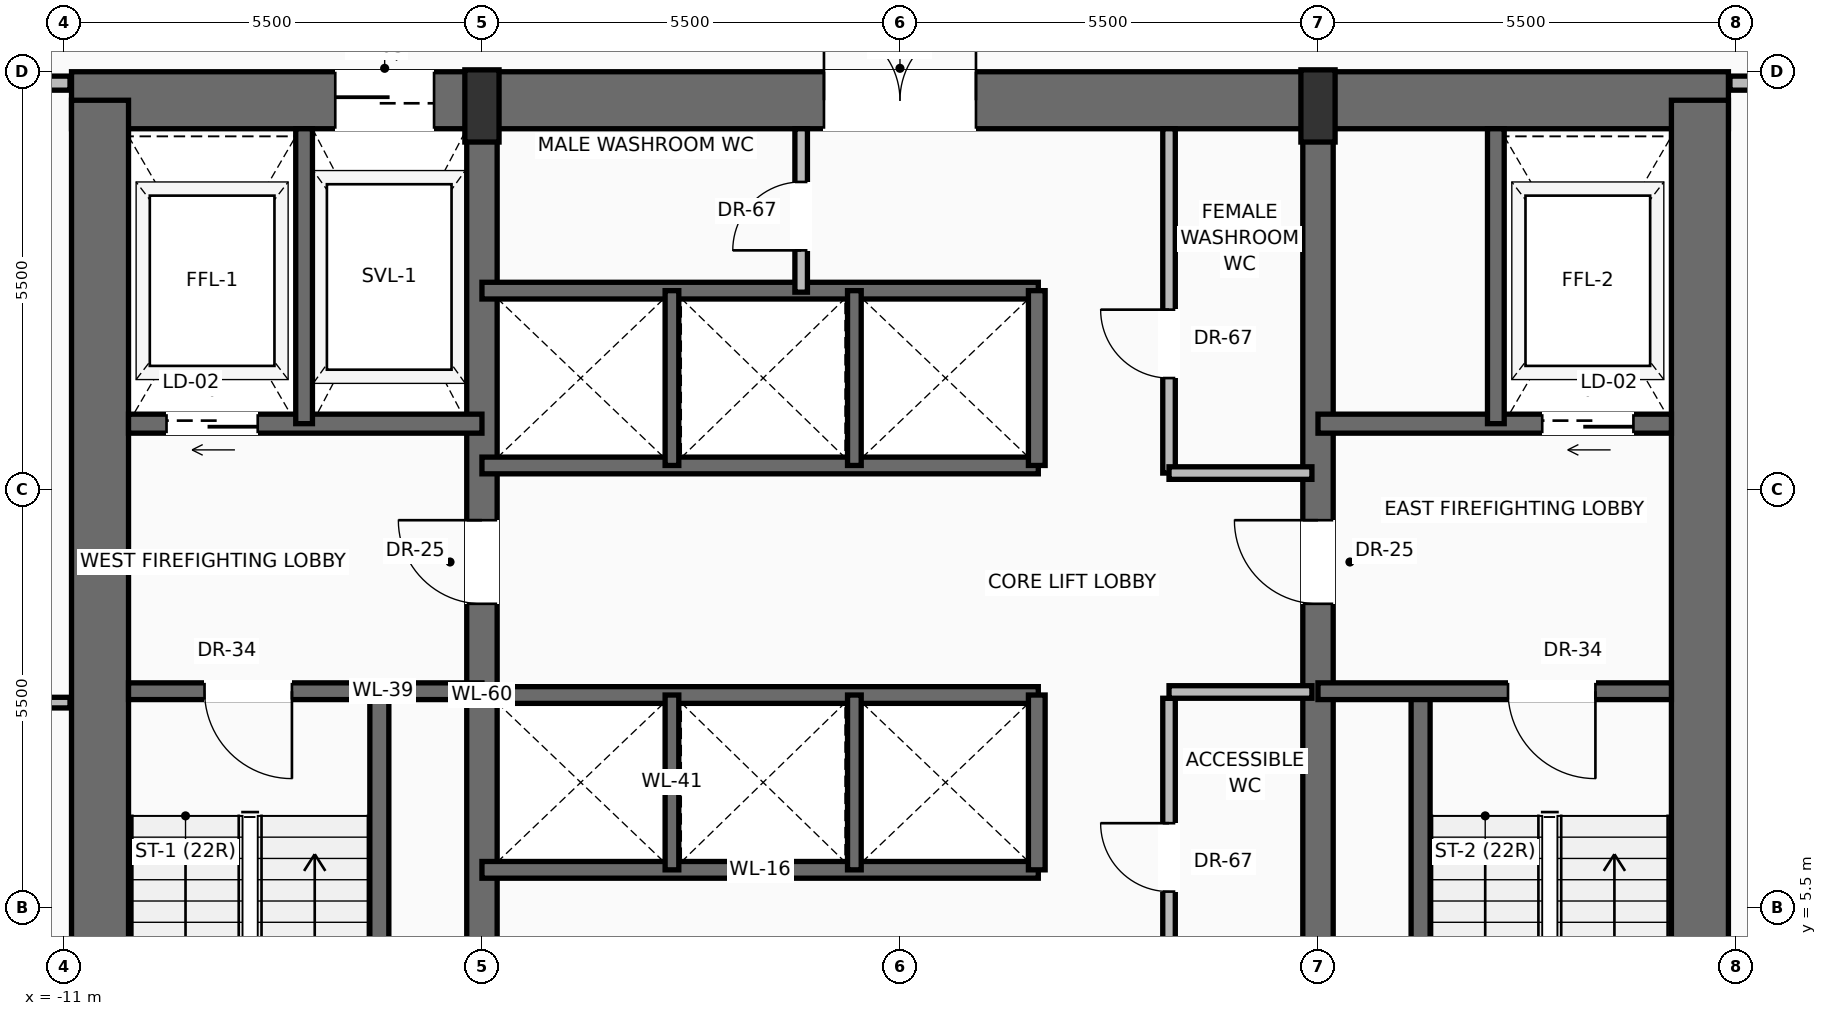
"""IFC4 building model, lengths in metres.
Left out: names, types, materials, properties, quantities, classifications, styles, units other than length and angle.
Written with IfcOpenShell. Run it as: python <this file> out.ifc"""

import sys

from ifc_helpers import new_model, si_unit, direction, frame, frame_2d, origin, origin_2d, place, context, subcontext, project, spatial, rectangle, extrude, source, transform, mapped, element, fill, save


model = new_model("IFC4")
c1 = context("Model", 3, precision=1e-05, world=origin(), true_north=direction((0.0, 1.0)))
c2 = subcontext(c1, "Body", "Model", "MODEL_VIEW")
j1 = project(units=[si_unit("LENGTHUNIT", "METRE"), si_unit("PLANEANGLEUNIT", "RADIAN")], contexts=[c1])
p1 = place(None, origin())
s1 = spatial("IfcSite", under=j1, at=p1, CompositionType="ELEMENT")
p2 = place(p1, origin())
s2 = spatial("IfcBuilding", under=s1, at=p2, CompositionType="ELEMENT")
p3 = place(p2, frame((0.0, 0.0, 106.2)))
s3 = spatial("IfcBuildingStorey", under=s2, at=p3, CompositionType="ELEMENT", Elevation=106.2)
p4 = place(p3, frame((-10.9, 16.125, 0.0), z_axis=(0.0, 0.0, 1.0), x_axis=(1.0, 0.0, 0.0)))
e1 = element("IfcWall", 1, at=p4, inside=s3, PredefinedType="SHEAR", context=c2, shape_type="SweptSolid", body=[
    extrude(rectangle(XDim=21.8, YDim=0.75, at=frame_2d((10.9, 0.0))), origin(), (0.0, 0.0, 1.0), 3.45),
])
p5 = place(p4, frame((3.47, 0.0, 0.0)))
e2 = element("IfcOpeningElement", 2, at=p5, cuts=e1, PredefinedType="OPENING", context=c2, shape_type="SweptSolid", body=[
    extrude(rectangle(XDim=1.3, YDim=2.3, at=frame_2d((0.65, 1.15))), frame((0.0, 0.385, 0.0), z_axis=(0.0, -1.0, 0.0), x_axis=(1.0, 0.0, 0.0)), (0.0, 0.0, 1.0), 0.77),
])
p6 = place(p4, frame((9.9, 0.0, 0.0)))
e3 = element("IfcOpeningElement", 3, at=p6, cuts=e1, PredefinedType="OPENING", context=c2, shape_type="SweptSolid", body=[
    extrude(rectangle(XDim=2.0, YDim=2.4, at=frame_2d((1.0, 1.2))), frame((0.0, 0.385, 0.0), z_axis=(0.0, -1.0, 0.0), x_axis=(1.0, 0.0, 0.0)), (0.0, 0.0, 1.0), 0.77),
])
for number, where, z_axis, x_axis in (
    (4, (-10.525, 0.475, 0.0), (0.0, 0.0, 1.0), (0.0, 1.0, 0.0)),
    (5, (10.525, 0.475, 0.0), (0.0, 0.0, 1.0), (0.0, 1.0, 0.0)),
):
    element("IfcWall", number, at=place(p3, frame(where, z_axis=z_axis, x_axis=x_axis)), inside=s3, PredefinedType="SHEAR", context=c2, shape_type="SweptSolid", body=[
        extrude(rectangle(XDim=15.65, YDim=0.75, at=frame_2d((7.825, 0.0))), origin(), (0.0, 0.0, 1.0), 3.45),
    ])
p7 = place(p3, frame((-5.5, 0.475, 0.0), z_axis=(0.0, 0.0, 1.0), x_axis=(0.0, 1.0, 0.0)))
e6 = element("IfcWall", 6, at=p7, inside=s3, PredefinedType="SHEAR", context=c2, shape_type="SweptSolid", body=[
    extrude(rectangle(XDim=15.65, YDim=0.4, at=frame_2d((7.825, 0.0))), origin(), (0.0, 0.0, 1.0), 3.45),
])
p8 = place(p7, frame((9.025, 0.0, 0.0)))
e7 = element("IfcOpeningElement", 7, at=p8, cuts=e6, PredefinedType="OPENING", context=c2, shape_type="SweptSolid", body=[
    extrude(rectangle(XDim=1.1, YDim=2.2, at=frame_2d((0.55, 1.1))), frame((0.0, 0.21, 0.0), z_axis=(0.0, -1.0, 0.0), x_axis=(1.0, 0.0, 0.0)), (0.0, 0.0, 1.0), 0.42),
])
p9 = place(p3, frame((5.5, 0.475, 0.0), z_axis=(0.0, 0.0, 1.0), x_axis=(0.0, 1.0, 0.0)))
e8 = element("IfcWall", 8, at=p9, inside=s3, PredefinedType="SHEAR", context=c2, shape_type="SweptSolid", body=[
    extrude(rectangle(XDim=15.65, YDim=0.4, at=frame_2d((7.825, 0.0))), origin(), (0.0, 0.0, 1.0), 3.45),
])
p10 = place(p9, frame((9.025, 0.0, 0.0)))
e9 = element("IfcOpeningElement", 9, at=p10, cuts=e8, PredefinedType="OPENING", context=c2, shape_type="SweptSolid", body=[
    extrude(rectangle(XDim=1.1, YDim=2.2, at=frame_2d((0.55, 1.1))), frame((0.0, 0.21, 0.0), z_axis=(0.0, -1.0, 0.0), x_axis=(1.0, 0.0, 0.0)), (0.0, 0.0, 1.0), 0.42),
])
m1 = source(origin(), c2, "Body", "SweptSolid", [
    extrude(rectangle(XDim=0.45, YDim=0.95, at=origin_2d()), origin(), (0.0, 0.0, 1.0), 3.7),
])
for number, where, z_axis, x_axis in (
    (10, (-5.5, 16.05, 0.0), (0.0, 0.0, 1.0), (1.0, 0.0, 0.0)),
    (11, (5.5, 16.05, 0.0), (0.0, 0.0, 1.0), (1.0, 0.0, 0.0)),
):
    element("IfcColumn", number, at=place(p3, frame(where, z_axis=z_axis, x_axis=x_axis)), inside=s3, PredefinedType="PILASTER", context=c2, shape_type="MappedRepresentation", body=[
        mapped(m1, transform((0.0, 0.0, 0.0), scale=1.0)),
    ])
p11 = place(p3, frame((-6.85, 0.85, 0.0), z_axis=(0.0, 0.0, 1.0), x_axis=(0.0, 1.0, 0.0)))
e12 = element("IfcWall", 12, at=p11, inside=s3, PredefinedType="SOLIDWALL", context=c2, shape_type="SweptSolid", body=[
    extrude(rectangle(XDim=7.5, YDim=0.25, at=frame_2d((3.75, 0.0))), origin(), (0.0, 0.0, 1.0), 3.45),
])
p12 = place(p3, frame((-5.5, 8.35, 0.0), z_axis=(0.0, 0.0, 1.0), x_axis=(-1.0, 0.0, 0.0)))
e13 = element("IfcWall", 13, at=p12, inside=s3, PredefinedType="SOLIDWALL", context=c2, shape_type="SweptSolid", body=[
    extrude(rectangle(XDim=4.65, YDim=0.22, at=frame_2d((2.325, 0.0))), origin(), (0.0, 0.0, 1.0), 3.45),
])
p13 = place(p12, frame((2.5, 0.0, 0.0)))
e14 = element("IfcOpeningElement", 14, at=p13, cuts=e13, PredefinedType="OPENING", context=c2, shape_type="SweptSolid", body=[
    extrude(rectangle(XDim=1.15, YDim=2.2, at=frame_2d((0.575, 1.1))), frame((0.0, 0.12, 0.0), z_axis=(0.0, -1.0, 0.0), x_axis=(1.0, 0.0, 0.0)), (0.0, 0.0, 1.0), 0.24),
])
p14 = place(p3, frame((-5.5, 11.87, 0.0), z_axis=(0.0, 0.0, 1.0), x_axis=(-1.0, 0.0, 0.0)))
e15 = element("IfcWall", 15, at=p14, inside=s3, PredefinedType="SOLIDWALL", context=c2, shape_type="SweptSolid", body=[
    extrude(rectangle(XDim=4.65, YDim=0.25, at=frame_2d((2.325, 0.0))), origin(), (0.0, 0.0, 1.0), 3.45),
])
p15 = place(p14, frame((2.95, 0.0, 0.0)))
e16 = element("IfcOpeningElement", 16, at=p15, cuts=e15, PredefinedType="OPENING", context=c2, shape_type="SweptSolid", body=[
    extrude(rectangle(XDim=1.2, YDim=2.25, at=frame_2d((0.6, 1.125))), frame((0.0, 0.135, 0.0), z_axis=(0.0, -1.0, 0.0), x_axis=(1.0, 0.0, 0.0)), (0.0, 0.0, 1.0), 0.27),
])
p16 = place(p3, frame((-7.84, 11.87, 0.0), z_axis=(0.0, 0.0, 1.0), x_axis=(0.0, 1.0, 0.0)))
e17 = element("IfcWall", 17, at=p16, inside=s3, PredefinedType="SOLIDWALL", context=c2, shape_type="SweptSolid", body=[
    extrude(rectangle(XDim=3.88, YDim=0.22, at=frame_2d((1.94, 0.0))), origin(), (0.0, 0.0, 1.0), 3.45),
])
p17 = place(p3, frame((6.85, 0.85, 0.0), z_axis=(0.0, 0.0, 1.0), x_axis=(0.0, 1.0, 0.0)))
e18 = element("IfcWall", 18, at=p17, inside=s3, PredefinedType="SOLIDWALL", context=c2, shape_type="SweptSolid", body=[
    extrude(rectangle(XDim=7.5, YDim=0.25, at=frame_2d((3.75, 0.0))), origin(), (0.0, 0.0, 1.0), 3.45),
])
p18 = place(p3, frame((10.15, 8.35, 0.0), z_axis=(0.0, 0.0, 1.0), x_axis=(-1.0, 0.0, 0.0)))
e19 = element("IfcWall", 19, at=p18, inside=s3, PredefinedType="SOLIDWALL", context=c2, shape_type="SweptSolid", body=[
    extrude(rectangle(XDim=4.65, YDim=0.22, at=frame_2d((2.325, 0.0))), origin(), (0.0, 0.0, 1.0), 3.45),
])
p19 = place(p18, frame((1.0, 0.0, 0.0)))
e20 = element("IfcOpeningElement", 20, at=p19, cuts=e19, PredefinedType="OPENING", context=c2, shape_type="SweptSolid", body=[
    extrude(rectangle(XDim=1.15, YDim=2.2, at=frame_2d((0.575, 1.1))), frame((0.0, 0.12, 0.0), z_axis=(0.0, -1.0, 0.0), x_axis=(1.0, 0.0, 0.0)), (0.0, 0.0, 1.0), 0.24),
])
p20 = place(p3, frame((10.15, 11.87, 0.0), z_axis=(0.0, 0.0, 1.0), x_axis=(-1.0, 0.0, 0.0)))
e21 = element("IfcWall", 21, at=p20, inside=s3, PredefinedType="SOLIDWALL", context=c2, shape_type="SweptSolid", body=[
    extrude(rectangle(XDim=4.65, YDim=0.25, at=frame_2d((2.325, 0.0))), origin(), (0.0, 0.0, 1.0), 3.45),
])
p21 = place(p20, frame((0.5, 0.0, 0.0)))
e22 = element("IfcOpeningElement", 22, at=p21, cuts=e21, PredefinedType="OPENING", context=c2, shape_type="SweptSolid", body=[
    extrude(rectangle(XDim=1.2, YDim=2.25, at=frame_2d((0.6, 1.125))), frame((0.0, 0.135, 0.0), z_axis=(0.0, -1.0, 0.0), x_axis=(1.0, 0.0, 0.0)), (0.0, 0.0, 1.0), 0.27),
])
p22 = place(p3, frame((7.84, 11.87, 0.0), z_axis=(0.0, 0.0, 1.0), x_axis=(0.0, 1.0, 0.0)))
e23 = element("IfcWall", 23, at=p22, inside=s3, PredefinedType="SOLIDWALL", context=c2, shape_type="SweptSolid", body=[
    extrude(rectangle(XDim=3.88, YDim=0.22, at=frame_2d((1.94, 0.0))), origin(), (0.0, 0.0, 1.0), 3.45),
])
p23 = place(p3, frame((3.54, 3.633, 0.0), z_axis=(0.0, 0.0, 1.0), x_axis=(0.0, 1.0, 0.0)))
e24 = element("IfcWall", 24, at=p23, inside=s3, PredefinedType="PARTITIONING", context=c2, shape_type="SweptSolid", body=[
    extrude(rectangle(XDim=4.625, YDim=0.165, at=frame_2d((2.312, 0.0))), origin(), (0.0, 0.0, 1.0), 3.442),
])
p24 = place(p23, frame((2.081, 0.0, 0.0)))
e25 = element("IfcOpeningElement", 25, at=p24, cuts=e24, PredefinedType="OPENING", context=c2, shape_type="SweptSolid", body=[
    extrude(rectangle(XDim=0.9, YDim=2.1, at=frame_2d((0.45, 1.05))), frame((0.0, 0.093, 0.0), z_axis=(0.0, -1.0, 0.0), x_axis=(1.0, 0.0, 0.0)), (0.0, 0.0, 1.0), 0.185),
])
p25 = place(p3, frame((3.54, 8.34, 0.0), z_axis=(0.0, 0.0, 1.0), x_axis=(1.0, 0.0, 0.0)))
e26 = element("IfcWall", 26, at=p25, inside=s3, PredefinedType="PARTITIONING", context=c2, shape_type="SweptSolid", body=[
    extrude(rectangle(XDim=1.88, YDim=0.165, at=frame_2d((0.94, 0.0))), origin(), (0.0, 0.0, 1.0), 3.442),
])
for number, where, z_axis, x_axis in (
    (27, (-5.5, 6.0, 0.0), (0.0, 0.0, 1.0), (1.0, 0.0, 0.0)),
    (28, (-5.5, 8.3, 0.0), (0.0, 0.0, 1.0), (1.0, 0.0, 0.0)),
):
    element("IfcWall", number, at=place(p3, frame(where, z_axis=z_axis, x_axis=x_axis)), inside=s3, PredefinedType="SOLIDWALL", context=c2, shape_type="SweptSolid", body=[
        extrude(rectangle(XDim=7.32, YDim=0.22, at=frame_2d((3.66, 0.0))), origin(), (0.0, 0.0, 1.0), 3.45),
    ])
p26 = place(p3, frame((1.8, 6.0, 0.0), z_axis=(0.0, 0.0, 1.0), x_axis=(0.0, 1.0, 0.0)))
e29 = element("IfcWall", 29, at=p26, inside=s3, PredefinedType="SOLIDWALL", context=c2, shape_type="SweptSolid", body=[
    extrude(rectangle(XDim=2.3, YDim=0.22, at=frame_2d((1.15, 0.0))), origin(), (0.0, 0.0, 1.0), 3.45),
])
for number, where, z_axis, x_axis in (
    (30, (-3.0, 6.0, 0.0), (0.0, 0.0, 1.0), (0.0, 1.0, 0.0)),
    (31, (-0.6, 6.0, 0.0), (0.0, 0.0, 1.0), (0.0, 1.0, 0.0)),
):
    element("IfcWall", number, at=place(p3, frame(where, z_axis=z_axis, x_axis=x_axis)), inside=s3, PredefinedType="SOLIDWALL", context=c2, shape_type="SweptSolid", body=[
        extrude(rectangle(XDim=2.3, YDim=0.18, at=frame_2d((1.15, 0.0))), origin(), (0.0, 0.0, 1.0), 3.45),
    ])
for number, where, z_axis, x_axis in (
    (32, (-5.5, 11.32, 0.0), (0.0, 0.0, 1.0), (1.0, 0.0, 0.0)),
    (33, (-5.5, 13.62, 0.0), (0.0, 0.0, 1.0), (1.0, 0.0, 0.0)),
):
    element("IfcWall", number, at=place(p3, frame(where, z_axis=z_axis, x_axis=x_axis)), inside=s3, PredefinedType="SOLIDWALL", context=c2, shape_type="SweptSolid", body=[
        extrude(rectangle(XDim=7.32, YDim=0.22, at=frame_2d((3.66, 0.0))), origin(), (0.0, 0.0, 1.0), 3.45),
    ])
p27 = place(p3, frame((1.8, 11.32, 0.0), z_axis=(0.0, 0.0, 1.0), x_axis=(0.0, 1.0, 0.0)))
e34 = element("IfcWall", 34, at=p27, inside=s3, PredefinedType="SOLIDWALL", context=c2, shape_type="SweptSolid", body=[
    extrude(rectangle(XDim=2.3, YDim=0.22, at=frame_2d((1.15, 0.0))), origin(), (0.0, 0.0, 1.0), 3.45),
])
for number, where, z_axis, x_axis in (
    (35, (-3.0, 11.32, 0.0), (0.0, 0.0, 1.0), (0.0, 1.0, 0.0)),
    (36, (-0.6, 11.32, 0.0), (0.0, 0.0, 1.0), (0.0, 1.0, 0.0)),
):
    element("IfcWall", number, at=place(p3, frame(where, z_axis=z_axis, x_axis=x_axis)), inside=s3, PredefinedType="SOLIDWALL", context=c2, shape_type="SweptSolid", body=[
        extrude(rectangle(XDim=2.3, YDim=0.18, at=frame_2d((1.15, 0.0))), origin(), (0.0, 0.0, 1.0), 3.45),
    ])
p28 = place(p3, frame((-1.3, 13.6, 0.0), z_axis=(0.0, 0.0, 1.0), x_axis=(0.0, 1.0, 0.0)))
e37 = element("IfcWall", 37, at=p28, inside=s3, PredefinedType="PARTITIONING", context=c2, shape_type="SweptSolid", body=[
    extrude(rectangle(XDim=2.15, YDim=0.165, at=frame_2d((1.075, 0.0))), origin(), (0.0, 0.0, 1.0), 3.442),
])
p29 = place(p28, frame((0.55, 0.0, 0.0)))
e38 = element("IfcOpeningElement", 38, at=p29, cuts=e37, PredefinedType="OPENING", context=c2, shape_type="SweptSolid", body=[
    extrude(rectangle(XDim=0.9, YDim=2.1, at=frame_2d((0.45, 1.05))), frame((0.0, 0.093, 0.0), z_axis=(0.0, -1.0, 0.0), x_axis=(1.0, 0.0, 0.0)), (0.0, 0.0, 1.0), 0.185),
])
p30 = place(p3, frame((3.54, 11.22, 0.0), z_axis=(0.0, 0.0, 1.0), x_axis=(0.0, 1.0, 0.0)))
e39 = element("IfcWall", 39, at=p30, inside=s3, PredefinedType="PARTITIONING", context=c2, shape_type="SweptSolid", body=[
    extrude(rectangle(XDim=4.53, YDim=0.165, at=frame_2d((2.265, 0.0))), origin(), (0.0, 0.0, 1.0), 3.442),
])
p31 = place(p30, frame((1.25, 0.0, 0.0)))
e40 = element("IfcOpeningElement", 40, at=p31, cuts=e39, PredefinedType="OPENING", context=c2, shape_type="SweptSolid", body=[
    extrude(rectangle(XDim=0.9, YDim=2.1, at=frame_2d((0.45, 1.05))), frame((0.0, 0.093, 0.0), z_axis=(0.0, -1.0, 0.0), x_axis=(1.0, 0.0, 0.0)), (0.0, 0.0, 1.0), 0.185),
])
p32 = place(p3, frame((3.54, 11.22, 0.0), z_axis=(0.0, 0.0, 1.0), x_axis=(1.0, 0.0, 0.0)))
e41 = element("IfcWall", 41, at=p32, inside=s3, PredefinedType="PARTITIONING", context=c2, shape_type="SweptSolid", body=[
    extrude(rectangle(XDim=1.88, YDim=0.165, at=frame_2d((0.94, 0.0))), origin(), (0.0, 0.0, 1.0), 3.442),
])
p33 = place(p3, frame((-22.649, 16.35, 0.0), z_axis=(0.0, 0.0, 1.0), x_axis=(1.0, 0.0, 0.0)))
e42 = element("IfcWall", 42, at=p33, inside=s3, PredefinedType="PARTITIONING", context=c2, shape_type="SweptSolid", body=[
    extrude(rectangle(XDim=11.729, YDim=0.185, at=frame_2d((5.865, 0.0))), origin(), (0.0, 0.0, 1.0), 2.747),
])
p34 = place(p33, frame((4.837, 0.0, 0.0)))
e43 = element("IfcOpeningElement", 43, at=p34, cuts=e42, PredefinedType="OPENING", context=c2, shape_type="SweptSolid", body=[
    extrude(rectangle(XDim=0.95, YDim=2.2, at=frame_2d((0.475, 1.1))), frame((0.0, 0.103, 0.0), z_axis=(0.0, -1.0, 0.0), x_axis=(1.0, 0.0, 0.0)), (0.0, 0.0, 1.0), 0.205),
])
p35 = place(p3, frame((10.92, 16.35, 0.0), z_axis=(0.0, 0.0, 1.0), x_axis=(1.0, 0.0, 0.0)))
e44 = element("IfcWall", 44, at=p35, inside=s3, PredefinedType="PARTITIONING", context=c2, shape_type="SweptSolid", body=[
    extrude(rectangle(XDim=12.133, YDim=0.185, at=frame_2d((6.066, 0.0))), origin(), (0.0, 0.0, 1.0), 2.747),
])
p36 = place(p35, frame((6.164, 0.0, 0.0)))
e45 = element("IfcOpeningElement", 45, at=p36, cuts=e44, PredefinedType="OPENING", context=c2, shape_type="SweptSolid", body=[
    extrude(rectangle(XDim=0.95, YDim=2.2, at=frame_2d((0.475, 1.1))), frame((0.0, 0.103, 0.0), z_axis=(0.0, -1.0, 0.0), x_axis=(1.0, 0.0, 0.0)), (0.0, 0.0, 1.0), 0.205),
])
p37 = place(p3, frame((-27.568, 8.2, 0.0), z_axis=(0.0, 0.0, 1.0), x_axis=(1.0, 0.0, 0.0)))
e46 = element("IfcWall", 46, at=p37, inside=s3, PredefinedType="PARTITIONING", context=c2, shape_type="SweptSolid", body=[
    extrude(rectangle(XDim=16.648, YDim=0.14, at=frame_2d((8.324, 0.0))), origin(), (0.0, 0.0, 1.0), 3.442),
])
p38 = place(p37, frame((7.858, 0.0, 0.0)))
e47 = element("IfcOpeningElement", 47, at=p38, cuts=e46, PredefinedType="OPENING", context=c2, shape_type="SweptSolid", body=[
    extrude(rectangle(XDim=0.95, YDim=2.2, at=frame_2d((0.475, 1.1))), frame((0.0, 0.08, 0.0), z_axis=(0.0, -1.0, 0.0), x_axis=(1.0, 0.0, 0.0)), (0.0, 0.0, 1.0), 0.16),
])
m2 = source(origin(), c2, "Body", "SweptSolid", [
    extrude(rectangle(XDim=1.15, YDim=2.2, at=frame_2d((0.575, 1.1))), frame((0.0, 0.025, 0.0), z_axis=(0.0, -1.0, 0.0), x_axis=(1.0, 0.0, 0.0)), (0.0, 0.0, 1.0), 0.05),
])
p39 = place(p13, origin())
e48 = element("IfcDoor", 48, at=p39, inside=s3, OperationType="SINGLE_SWING_LEFT", PredefinedType="DOOR", context=c2, shape_type="MappedRepresentation", body=[
    mapped(m2, transform((0.0, 0.0, 0.0), scale=1.0)),
])
fill(e14, e48)
m3 = source(origin(), c2, "Body", "SweptSolid", [
    extrude(rectangle(XDim=1.1, YDim=2.2, at=frame_2d((0.55, 1.1))), frame((0.0, 0.025, 0.0), z_axis=(0.0, -1.0, 0.0), x_axis=(1.0, 0.0, 0.0)), (0.0, 0.0, 1.0), 0.05),
])
p40 = place(p8, origin())
e49 = element("IfcDoor", 49, at=p40, inside=s3, OperationType="SINGLE_SWING_RIGHT", PredefinedType="DOOR", context=c2, shape_type="MappedRepresentation", body=[
    mapped(m3, transform((0.0, 0.0, 0.0), scale=1.0)),
])
fill(e7, e49)
m4 = source(origin(), c2, "Body", "SweptSolid", [
    extrude(rectangle(XDim=1.2, YDim=2.25, at=frame_2d((0.6, 1.125))), frame((0.0, 0.025, 0.0), z_axis=(0.0, -1.0, 0.0), x_axis=(1.0, 0.0, 0.0)), (0.0, 0.0, 1.0), 0.05),
])
p41 = place(p15, origin())
e50 = element("IfcDoor", 50, at=p41, inside=s3, OperationType="SLIDING_TO_LEFT", PredefinedType="DOOR", context=c2, shape_type="MappedRepresentation", body=[
    mapped(m4, transform((0.0, 0.0, 0.0), scale=1.0)),
])
fill(e16, e50)
m5 = source(origin(), c2, "Body", "SweptSolid", [
    extrude(rectangle(XDim=1.3, YDim=2.3, at=frame_2d((0.65, 1.15))), frame((0.0, 0.025, 0.0), z_axis=(0.0, -1.0, 0.0), x_axis=(1.0, 0.0, 0.0)), (0.0, 0.0, 1.0), 0.05),
])
p42 = place(p5, origin())
e51 = element("IfcDoor", 51, at=p42, inside=s3, OperationType="SLIDING_TO_RIGHT", PredefinedType="DOOR", context=c2, shape_type="MappedRepresentation", body=[
    mapped(m5, transform((0.0, 0.0, 0.0), scale=1.0)),
])
fill(e2, e51)
p43 = place(p19, origin())
e52 = element("IfcDoor", 52, at=p43, inside=s3, OperationType="SINGLE_SWING_LEFT", PredefinedType="DOOR", context=c2, shape_type="MappedRepresentation", body=[
    mapped(m2, transform((0.0, 0.0, 0.0), scale=1.0)),
])
fill(e20, e52)
p44 = place(p10, origin())
e53 = element("IfcDoor", 53, at=p44, inside=s3, OperationType="SINGLE_SWING_RIGHT", PredefinedType="DOOR", context=c2, shape_type="MappedRepresentation", body=[
    mapped(m3, transform((0.0, 0.0, 0.0), scale=1.0)),
])
fill(e9, e53)
p45 = place(p21, origin())
e54 = element("IfcDoor", 54, at=p45, inside=s3, OperationType="SLIDING_TO_RIGHT", PredefinedType="DOOR", context=c2, shape_type="MappedRepresentation", body=[
    mapped(m4, transform((0.0, 0.0, 0.0), scale=1.0)),
])
fill(e22, e54)
m6 = source(origin(), c2, "Body", "SweptSolid", [
    extrude(rectangle(XDim=2.0, YDim=2.4, at=frame_2d((1.0, 1.2))), frame((0.0, 0.025, 0.0), z_axis=(0.0, -1.0, 0.0), x_axis=(1.0, 0.0, 0.0)), (0.0, 0.0, 1.0), 0.05),
])
p46 = place(p6, origin())
e55 = element("IfcDoor", 55, at=p46, inside=s3, OperationType="DOUBLE_DOOR_SINGLE_SWING", PredefinedType="DOOR", context=c2, shape_type="MappedRepresentation", body=[
    mapped(m6, transform((0.0, 0.0, 0.0), scale=1.0)),
])
fill(e3, e55)
m7 = source(origin(), c2, "Body", "SweptSolid", [
    extrude(rectangle(XDim=0.9, YDim=2.1, at=frame_2d((0.45, 1.05))), frame((0.0, 0.025, 0.0), z_axis=(0.0, -1.0, 0.0), x_axis=(1.0, 0.0, 0.0)), (0.0, 0.0, 1.0), 0.05),
])
p47 = place(p24, origin())
e56 = element("IfcDoor", 56, at=p47, inside=s3, OperationType="SINGLE_SWING_RIGHT", PredefinedType="DOOR", context=c2, shape_type="MappedRepresentation", body=[
    mapped(m7, transform((0.0, 0.0, 0.0), scale=1.0)),
])
fill(e25, e56)
p48 = place(p29, origin())
e57 = element("IfcDoor", 57, at=p48, inside=s3, OperationType="SINGLE_SWING_LEFT", PredefinedType="DOOR", context=c2, shape_type="MappedRepresentation", body=[
    mapped(m7, transform((0.0, 0.0, 0.0), scale=1.0)),
])
fill(e38, e57)
p49 = place(p31, origin())
e58 = element("IfcDoor", 58, at=p49, inside=s3, OperationType="SINGLE_SWING_RIGHT", PredefinedType="DOOR", context=c2, shape_type="MappedRepresentation", body=[
    mapped(m7, transform((0.0, 0.0, 0.0), scale=1.0)),
])
fill(e40, e58)
save(model, sys.argv[1])
